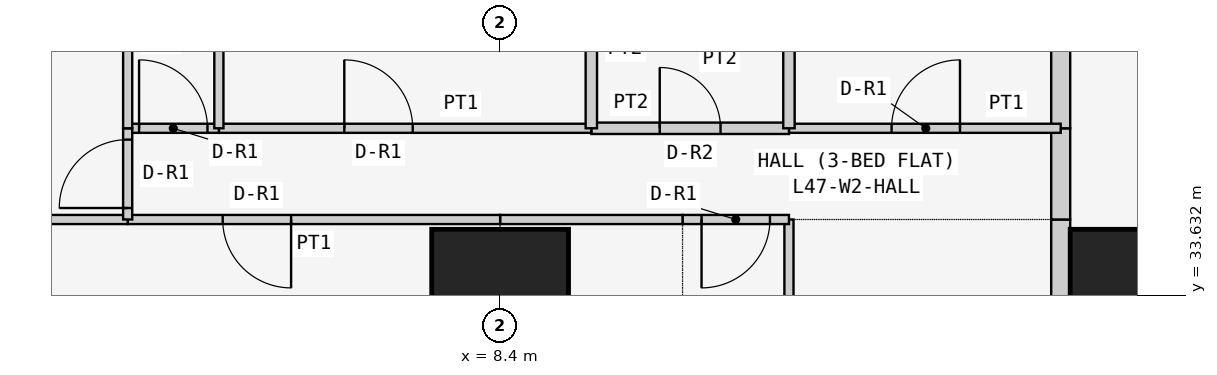
"""IFC4 building model, lengths in metres.
Left out: names, types, materials, properties, quantities, classifications, styles, units other than length and angle.
Written with IfcOpenShell. Run it as: python <this file> out.ifc"""

import sys

from ifc_helpers import new_model, si_unit, direction, frame, frame_2d, origin, origin_2d, place, context, subcontext, project, spatial, rectangle, extrude, element, fill, save


model = new_model("IFC4")
c1 = context("Model", 3, precision=1e-05, world=origin(), true_north=direction((0.0, 1.0)))
c2 = subcontext(c1, "Body", "Model", "MODEL_VIEW")
j1 = project(units=[si_unit("LENGTHUNIT", "METRE"), si_unit("PLANEANGLEUNIT", "RADIAN")], contexts=[c1])
p1 = place(None, origin())
s1 = spatial("IfcSite", under=j1, at=p1, CompositionType="ELEMENT")
p2 = place(p1, origin())
s2 = spatial("IfcBuilding", under=s1, at=p2, CompositionType="ELEMENT")
p3 = place(p2, frame((0.0, 0.0, 183.3)))
s3 = spatial("IfcBuildingStorey", under=s2, at=p3, CompositionType="ELEMENT", Elevation=183.3)
for number, where, z_axis, x_axis in (
    (1, (8.4, 33.6, 0.0), (0.0, 0.0, 1.0), (1.0, 0.0, 0.0)),
    (2, (16.8, 33.6, 0.0), (0.0, 0.0, 1.0), (1.0, 0.0, 0.0)),
):
    element("IfcColumn", number, at=place(p3, frame(where, z_axis=z_axis, x_axis=x_axis)), inside=s3, PredefinedType="COLUMN", context=c2, shape_type="SweptSolid", body=[
        extrude(rectangle(XDim=1.8, YDim=1.8, at=origin_2d()), origin(), (0.0, 0.0, 1.0), 3.6),
    ])
p4 = place(p3, frame((15.775, 29.4, 0.0), z_axis=(0.0, 0.0, 1.0), x_axis=(0.0, 1.0, 0.0)))
e3 = element("IfcWall", 3, at=p4, inside=s3, PredefinedType="PARTITIONING", context=c2, shape_type="SweptSolid", body=[
    extrude(rectangle(XDim=5.229, YDim=0.25, at=frame_2d((2.615, 0.0))), origin(), (0.0, 0.0, 1.0), 3.45),
])
p5 = place(p4, frame((2.1, 0.0, 0.0)))
e4 = element("IfcOpeningElement", 4, at=p5, cuts=e3, PredefinedType="OPENING", context=c2, shape_type="SweptSolid", body=[
    extrude(rectangle(XDim=1.0, YDim=2.1, at=frame_2d((0.5, 1.05))), frame((0.0, 0.135, 0.0), z_axis=(0.0, -1.0, 0.0), x_axis=(1.0, 0.0, 0.0)), (0.0, 0.0, 1.0), 0.27),
])
p6 = place(p3, frame((15.775, 34.629, 0.0), z_axis=(0.0, 0.0, 1.0), x_axis=(0.0, 1.0, 0.0)))
e5 = element("IfcWall", 5, at=p6, inside=s3, PredefinedType="PARTITIONING", context=c2, shape_type="SweptSolid", body=[
    extrude(rectangle(XDim=1.2, YDim=0.25, at=frame_2d((0.6, 0.0))), origin(), (0.0, 0.0, 1.0), 3.45),
])
p7 = place(p3, frame((15.775, 35.829, 0.0), z_axis=(0.0, 0.0, 1.0), x_axis=(0.0, 1.0, 0.0)))
e6 = element("IfcWall", 6, at=p7, inside=s3, PredefinedType="PARTITIONING", context=c2, shape_type="SweptSolid", body=[
    extrude(rectangle(XDim=6.871, YDim=0.25, at=frame_2d((3.436, 0.0))), origin(), (0.0, 0.0, 1.0), 3.45),
])
p8 = place(p3, frame((12.2, 29.4, 0.0), z_axis=(0.0, 0.0, 1.0), x_axis=(0.0, 1.0, 0.0)))
e7 = element("IfcWall", 7, at=p8, inside=s3, PredefinedType="PARTITIONING", context=c2, shape_type="SweptSolid", body=[
    extrude(rectangle(XDim=5.229, YDim=0.12, at=frame_2d((2.615, 0.0))), origin(), (0.0, 0.0, 1.0), 3.45),
])
p9 = place(p3, frame((10.8, 34.629, 0.0), z_axis=(0.0, 0.0, 1.0), x_axis=(1.0, 0.0, 0.0)))
e8 = element("IfcWall", 8, at=p9, inside=s3, PredefinedType="PARTITIONING", context=c2, shape_type="SweptSolid", body=[
    extrude(rectangle(XDim=1.4, YDim=0.12, at=frame_2d((0.7, 0.0))), origin(), (0.0, 0.0, 1.0), 3.45),
])
p10 = place(p9, frame((0.25, 0.0, 0.0)))
e9 = element("IfcOpeningElement", 9, at=p10, cuts=e8, PredefinedType="OPENING", context=c2, shape_type="SweptSolid", body=[
    extrude(rectangle(XDim=0.9, YDim=2.1, at=frame_2d((0.45, 1.05))), frame((0.0, 0.07, 0.0), z_axis=(0.0, -1.0, 0.0), x_axis=(1.0, 0.0, 0.0)), (0.0, 0.0, 1.0), 0.14),
])
p11 = place(p3, frame((8.4, 34.629, 0.0), z_axis=(0.0, 0.0, 1.0), x_axis=(1.0, 0.0, 0.0)))
e10 = element("IfcWall", 10, at=p11, inside=s3, PredefinedType="PARTITIONING", context=c2, shape_type="SweptSolid", body=[
    extrude(rectangle(XDim=2.4, YDim=0.12, at=frame_2d((1.2, 0.0))), origin(), (0.0, 0.0, 1.0), 3.45),
])
p12 = place(p3, frame((3.5, 34.629, 0.0), z_axis=(0.0, 0.0, 1.0), x_axis=(1.0, 0.0, 0.0)))
e11 = element("IfcWall", 11, at=p12, inside=s3, PredefinedType="PARTITIONING", context=c2, shape_type="SweptSolid", body=[
    extrude(rectangle(XDim=4.9, YDim=0.12, at=frame_2d((2.45, 0.0))), origin(), (0.0, 0.0, 1.0), 3.45),
])
p13 = place(p12, frame((1.25, 0.0, 0.0)))
e12 = element("IfcOpeningElement", 12, at=p13, cuts=e11, PredefinedType="OPENING", context=c2, shape_type="SweptSolid", body=[
    extrude(rectangle(XDim=0.9, YDim=2.1, at=frame_2d((0.45, 1.05))), frame((0.0, 0.07, 0.0), z_axis=(0.0, -1.0, 0.0), x_axis=(1.0, 0.0, 0.0)), (0.0, 0.0, 1.0), 0.14),
])
p14 = place(p3, frame((-0.65, 34.629, 0.0), z_axis=(0.0, 0.0, 1.0), x_axis=(1.0, 0.0, 0.0)))
e13 = element("IfcWall", 13, at=p14, inside=s3, PredefinedType="PARTITIONING", context=c2, shape_type="SweptSolid", body=[
    extrude(rectangle(XDim=4.15, YDim=0.12, at=frame_2d((2.075, 0.0))), origin(), (0.0, 0.0, 1.0), 3.45),
])
p15 = place(p3, frame((12.2, 35.829, 0.0), z_axis=(0.0, 0.0, 1.0), x_axis=(1.0, 0.0, 0.0)))
e14 = element("IfcWall", 14, at=p15, inside=s3, PredefinedType="PARTITIONING", context=c2, shape_type="SweptSolid", body=[
    extrude(rectangle(XDim=3.575, YDim=0.12, at=frame_2d((1.788, 0.0))), origin(), (0.0, 0.0, 1.0), 3.45),
])
p16 = place(p15, frame((1.35, 0.0, 0.0)))
e15 = element("IfcOpeningElement", 15, at=p16, cuts=e14, PredefinedType="OPENING", context=c2, shape_type="SweptSolid", body=[
    extrude(rectangle(XDim=0.9, YDim=2.1, at=frame_2d((0.45, 1.05))), frame((0.0, 0.07, 0.0), z_axis=(0.0, -1.0, 0.0), x_axis=(1.0, 0.0, 0.0)), (0.0, 0.0, 1.0), 0.14),
])
p17 = place(p3, frame((9.6, 35.829, 0.0), z_axis=(0.0, 0.0, 1.0), x_axis=(1.0, 0.0, 0.0)))
e16 = element("IfcWall", 16, at=p17, inside=s3, PredefinedType="PARTITIONING", context=c2, shape_type="SweptSolid", body=[
    extrude(rectangle(XDim=2.6, YDim=0.15, at=frame_2d((1.3, 0.0))), origin(), (0.0, 0.0, 1.0), 3.45),
])
p18 = place(p17, frame((0.9, 0.0, 0.0)))
e17 = element("IfcOpeningElement", 17, at=p18, cuts=e16, PredefinedType="OPENING", context=c2, shape_type="SweptSolid", body=[
    extrude(rectangle(XDim=0.8, YDim=2.1, at=frame_2d((0.4, 1.05))), frame((0.0, 0.085, 0.0), z_axis=(0.0, -1.0, 0.0), x_axis=(1.0, 0.0, 0.0)), (0.0, 0.0, 1.0), 0.17),
])
p19 = place(p3, frame((4.7, 35.829, 0.0), z_axis=(0.0, 0.0, 1.0), x_axis=(1.0, 0.0, 0.0)))
e18 = element("IfcWall", 18, at=p19, inside=s3, PredefinedType="PARTITIONING", context=c2, shape_type="SweptSolid", body=[
    extrude(rectangle(XDim=4.9, YDim=0.12, at=frame_2d((2.45, 0.0))), origin(), (0.0, 0.0, 1.0), 3.45),
])
p20 = place(p19, frame((1.65, 0.0, 0.0)))
e19 = element("IfcOpeningElement", 19, at=p20, cuts=e18, PredefinedType="OPENING", context=c2, shape_type="SweptSolid", body=[
    extrude(rectangle(XDim=0.9, YDim=2.1, at=frame_2d((0.45, 1.05))), frame((0.0, 0.07, 0.0), z_axis=(0.0, -1.0, 0.0), x_axis=(1.0, 0.0, 0.0)), (0.0, 0.0, 1.0), 0.14),
])
p21 = place(p3, frame((3.5, 35.829, 0.0), z_axis=(0.0, 0.0, 1.0), x_axis=(1.0, 0.0, 0.0)))
e20 = element("IfcWall", 20, at=p21, inside=s3, PredefinedType="PARTITIONING", context=c2, shape_type="SweptSolid", body=[
    extrude(rectangle(XDim=1.2, YDim=0.12, at=frame_2d((0.6, 0.0))), origin(), (0.0, 0.0, 1.0), 3.45),
])
p22 = place(p21, frame((0.15, 0.0, 0.0)))
e21 = element("IfcOpeningElement", 21, at=p22, cuts=e20, PredefinedType="OPENING", context=c2, shape_type="SweptSolid", body=[
    extrude(rectangle(XDim=0.9, YDim=2.1, at=frame_2d((0.45, 1.05))), frame((0.0, 0.07, 0.0), z_axis=(0.0, -1.0, 0.0), x_axis=(1.0, 0.0, 0.0)), (0.0, 0.0, 1.0), 0.14),
])
p23 = place(p3, frame((3.5, 34.629, 0.0), z_axis=(0.0, 0.0, 1.0), x_axis=(0.0, 1.0, 0.0)))
e22 = element("IfcWall", 22, at=p23, inside=s3, PredefinedType="PARTITIONING", context=c2, shape_type="SweptSolid", body=[
    extrude(rectangle(XDim=1.2, YDim=0.12, at=frame_2d((0.6, 0.0))), origin(), (0.0, 0.0, 1.0), 3.45),
])
p24 = place(p23, frame((0.151, 0.0, 0.0)))
e23 = element("IfcOpeningElement", 23, at=p24, cuts=e22, PredefinedType="OPENING", context=c2, shape_type="SweptSolid", body=[
    extrude(rectangle(XDim=0.9, YDim=2.1, at=frame_2d((0.45, 1.05))), frame((0.0, 0.07, 0.0), z_axis=(0.0, -1.0, 0.0), x_axis=(1.0, 0.0, 0.0)), (0.0, 0.0, 1.0), 0.14),
])
for number, where, z_axis, x_axis in (
    (24, (12.2, 35.829, 0.0), (0.0, 0.0, 1.0), (0.0, 1.0, 0.0)),
    (25, (9.6, 35.829, 0.0), (0.0, 0.0, 1.0), (0.0, 1.0, 0.0)),
):
    element("IfcWall", number, at=place(p3, frame(where, z_axis=z_axis, x_axis=x_axis)), inside=s3, PredefinedType="PARTITIONING", context=c2, shape_type="SweptSolid", body=[
        extrude(rectangle(XDim=2.971, YDim=0.15, at=frame_2d((1.485, 0.0))), origin(), (0.0, 0.0, 1.0), 3.45),
    ])
for number, where, z_axis, x_axis in (
    (26, (4.7, 35.829, 0.0), (0.0, 0.0, 1.0), (0.0, 1.0, 0.0)),
    (27, (3.5, 35.829, 0.0), (0.0, 0.0, 1.0), (0.0, 1.0, 0.0)),
):
    element("IfcWall", number, at=place(p3, frame(where, z_axis=z_axis, x_axis=x_axis)), inside=s3, PredefinedType="PARTITIONING", context=c2, shape_type="SweptSolid", body=[
        extrude(rectangle(XDim=2.285, YDim=0.12, at=frame_2d((1.143, 0.0))), origin(), (0.0, 0.0, 1.0), 3.45),
    ])
p25 = place(p10, frame((0.9, 0.0, 0.0), z_axis=(0.0, 0.0, 1.0), x_axis=(-1.0, 0.0, 0.0)))
e28 = element("IfcDoor", 28, at=p25, inside=s3, OperationType="SINGLE_SWING_RIGHT", PredefinedType="DOOR", context=c2, shape_type="SweptSolid", body=[
    extrude(rectangle(XDim=0.9, YDim=2.1, at=frame_2d((0.45, 1.05))), frame((0.0, 0.025, 0.0), z_axis=(0.0, -1.0, 0.0), x_axis=(1.0, 0.0, 0.0)), (0.0, 0.0, 1.0), 0.05),
])
fill(e9, e28)
p26 = place(p13, frame((0.9, 0.0, 0.0), z_axis=(0.0, 0.0, 1.0), x_axis=(-1.0, 0.0, 0.0)))
e29 = element("IfcDoor", 29, at=p26, inside=s3, OperationType="SINGLE_SWING_LEFT", PredefinedType="DOOR", context=c2, shape_type="SweptSolid", body=[
    extrude(rectangle(XDim=0.9, YDim=2.1, at=frame_2d((0.45, 1.05))), frame((0.0, 0.025, 0.0), z_axis=(0.0, -1.0, 0.0), x_axis=(1.0, 0.0, 0.0)), (0.0, 0.0, 1.0), 0.05),
])
fill(e12, e29)
p27 = place(p16, origin())
e30 = element("IfcDoor", 30, at=p27, inside=s3, OperationType="SINGLE_SWING_RIGHT", PredefinedType="DOOR", context=c2, shape_type="SweptSolid", body=[
    extrude(rectangle(XDim=0.9, YDim=2.1, at=frame_2d((0.45, 1.05))), frame((0.0, 0.025, 0.0), z_axis=(0.0, -1.0, 0.0), x_axis=(1.0, 0.0, 0.0)), (0.0, 0.0, 1.0), 0.05),
])
fill(e15, e30)
p28 = place(p18, origin())
e31 = element("IfcDoor", 31, at=p28, inside=s3, OperationType="SINGLE_SWING_LEFT", PredefinedType="DOOR", context=c2, shape_type="SweptSolid", body=[
    extrude(rectangle(XDim=0.8, YDim=2.1, at=frame_2d((0.4, 1.05))), frame((0.0, 0.025, 0.0), z_axis=(0.0, -1.0, 0.0), x_axis=(1.0, 0.0, 0.0)), (0.0, 0.0, 1.0), 0.05),
])
fill(e17, e31)
p29 = place(p20, origin())
e32 = element("IfcDoor", 32, at=p29, inside=s3, OperationType="SINGLE_SWING_LEFT", PredefinedType="DOOR", context=c2, shape_type="SweptSolid", body=[
    extrude(rectangle(XDim=0.9, YDim=2.1, at=frame_2d((0.45, 1.05))), frame((0.0, 0.025, 0.0), z_axis=(0.0, -1.0, 0.0), x_axis=(1.0, 0.0, 0.0)), (0.0, 0.0, 1.0), 0.05),
])
fill(e19, e32)
p30 = place(p22, origin())
e33 = element("IfcDoor", 33, at=p30, inside=s3, OperationType="SINGLE_SWING_LEFT", PredefinedType="DOOR", context=c2, shape_type="SweptSolid", body=[
    extrude(rectangle(XDim=0.9, YDim=2.1, at=frame_2d((0.45, 1.05))), frame((0.0, 0.025, 0.0), z_axis=(0.0, -1.0, 0.0), x_axis=(1.0, 0.0, 0.0)), (0.0, 0.0, 1.0), 0.05),
])
fill(e21, e33)
p31 = place(p24, origin())
e34 = element("IfcDoor", 34, at=p31, inside=s3, OperationType="SINGLE_SWING_LEFT", PredefinedType="DOOR", context=c2, shape_type="SweptSolid", body=[
    extrude(rectangle(XDim=0.9, YDim=2.1, at=frame_2d((0.45, 1.05))), frame((0.0, 0.025, 0.0), z_axis=(0.0, -1.0, 0.0), x_axis=(1.0, 0.0, 0.0)), (0.0, 0.0, 1.0), 0.05),
])
fill(e23, e34)
save(model, sys.argv[1])
